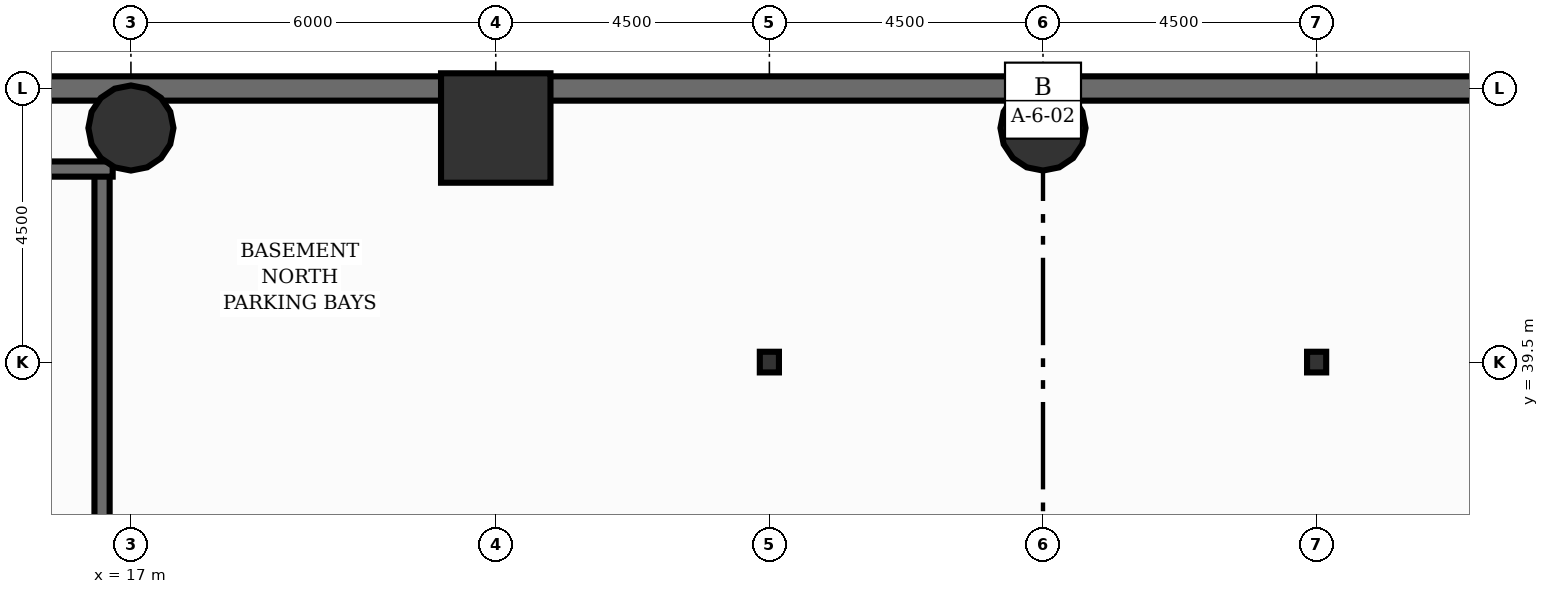
"""IFC4 building model, lengths in metres.
Left out: names, types, materials, properties, quantities, classifications, styles, units other than length and angle.
Written with IfcOpenShell. Run it as: python <this file> out.ifc"""

import sys

from ifc_helpers import new_model, si_unit, direction, frame, frame_2d, origin, origin_2d, place, context, subcontext, project, spatial, rectangle, circle, i_section, extrude, element, save


model = new_model("IFC4")
c1 = context("Model", 3, precision=1e-05, world=origin(), true_north=direction((0.0, 1.0)))
c2 = subcontext(c1, "Body", "Model", "MODEL_VIEW")
j1 = project(units=[si_unit("LENGTHUNIT", "METRE"), si_unit("PLANEANGLEUNIT", "RADIAN")], contexts=[c1])
p1 = place(None, origin())
s1 = spatial("IfcSite", under=j1, at=p1, CompositionType="ELEMENT")
p2 = place(p1, origin())
s2 = spatial("IfcBuilding", under=s1, at=p2, CompositionType="ELEMENT")
p3 = place(p2, frame((0.0, 0.0, -9.0)))
s3 = spatial("IfcBuildingStorey", under=s2, at=p3, CompositionType="ELEMENT", Elevation=-9.0)
p4 = place(p3, frame((16.525, 16.0, 0.0), z_axis=(0.0, 0.0, 1.0), x_axis=(0.0, 1.0, 0.0)))
e1 = element("IfcWall", 1, at=p4, inside=s3, PredefinedType="SHEAR", context=c2, shape_type="SweptSolid", body=[
    extrude(rectangle(XDim=26.7, YDim=0.25, at=frame_2d((13.35, 0.0))), origin(), (0.0, 0.0, 1.0), 4.5),
])
p5 = place(p3, frame((4.2, 42.675, 0.0), z_axis=(0.0, 0.0, 1.0), x_axis=(1.0, 0.0, 0.0)))
e2 = element("IfcWall", 2, at=p5, inside=s3, PredefinedType="SHEAR", context=c2, shape_type="SweptSolid", body=[
    extrude(rectangle(XDim=12.5, YDim=0.25, at=frame_2d((6.25, 0.0))), origin(), (0.0, 0.0, 1.0), 4.5),
])
p6 = place(p3, frame((3.8, 44.0, 0.0), z_axis=(0.0, 0.0, 1.0), x_axis=(1.0, 0.0, 0.0)))
e3 = element("IfcWall", 3, at=p6, inside=s3, PredefinedType="USERDEFINED", context=c2, shape_type="SweptSolid", body=[
    extrude(rectangle(XDim=56.4, YDim=0.4, at=frame_2d((28.2, 0.0))), origin(), (0.0, 0.0, 1.0), 4.5),
])
p7 = place(p3, frame((17.0, 43.35, 0.0), z_axis=(0.0, 0.0, 1.0), x_axis=(1.0, 0.0, 0.0)))
e4 = element("IfcColumn", 4, at=p7, inside=s3, PredefinedType="COLUMN", context=c2, shape_type="SweptSolid", body=[
    extrude(circle(Radius=0.7, at=origin_2d()), origin(), (0.0, 0.0, 1.0), 4.5),
])
p8 = place(p3, frame((23.0, 43.35, 0.0), z_axis=(0.0, 0.0, 1.0), x_axis=(1.0, 0.0, 0.0)))
e5 = element("IfcColumn", 5, at=p8, inside=s3, PredefinedType="COLUMN", context=c2, shape_type="SweptSolid", body=[
    extrude(rectangle(XDim=1.8, YDim=1.8, at=origin_2d()), origin(), (0.0, 0.0, 1.0), 4.5),
])
p9 = place(p3, frame((32.0, 43.35, 0.0), z_axis=(0.0, 0.0, 1.0), x_axis=(1.0, 0.0, 0.0)))
e6 = element("IfcColumn", 6, at=p9, inside=s3, PredefinedType="COLUMN", context=c2, shape_type="SweptSolid", body=[
    extrude(circle(Radius=0.7, at=origin_2d()), origin(), (0.0, 0.0, 1.0), 4.5),
])
for number, where, z_axis, x_axis in (
    (7, (27.5, 39.5, 0.0), (0.0, 0.0, 1.0), (1.0, 0.0, 0.0)),
    (8, (36.5, 39.5, 0.0), (0.0, 0.0, 1.0), (1.0, 0.0, 0.0)),
):
    element("IfcColumn", number, at=place(p3, frame(where, z_axis=z_axis, x_axis=x_axis)), inside=s3, PredefinedType="COLUMN", context=c2, shape_type="SweptSolid", body=[
        extrude(i_section(OverallWidth=0.314, OverallDepth=0.34, WebThickness=0.019, FlangeThickness=0.031, at=origin_2d()), origin(), (0.0, 0.0, 1.0), 4.5),
    ])
save(model, sys.argv[1])
